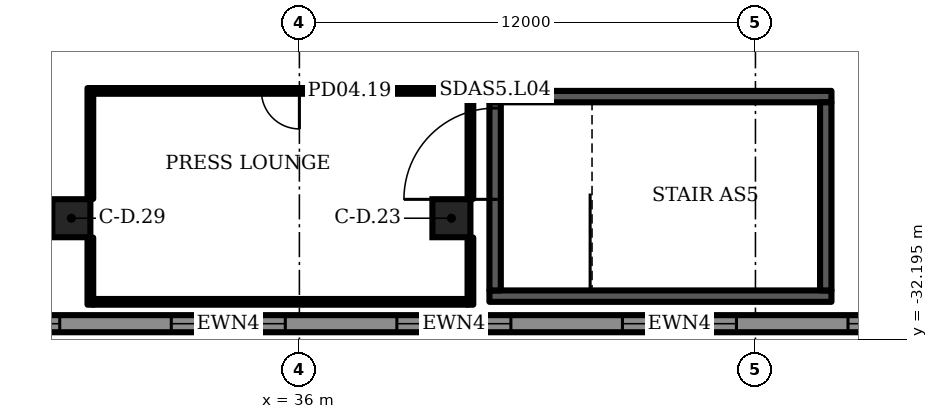
"""IFC4 building model, lengths in metres.
Left out: names, types, materials, properties, quantities, classifications, styles, units other than length and angle.
Written with IfcOpenShell. Run it as: python <this file> out.ifc"""

import sys

from ifc_helpers import new_model, si_unit, direction, frame, frame_2d, origin, origin_2d, place, context, subcontext, project, spatial, rectangle, extrude, element, fill, save


model = new_model("IFC4")
c1 = context("Model", 3, precision=1e-05, world=origin(), true_north=direction((0.0, 1.0)))
c2 = subcontext(c1, "Body", "Model", "MODEL_VIEW")
j1 = project(units=[si_unit("LENGTHUNIT", "METRE"), si_unit("PLANEANGLEUNIT", "RADIAN")], contexts=[c1])
p1 = place(None, origin())
s1 = spatial("IfcSite", under=j1, at=p1, CompositionType="ELEMENT")
p2 = place(p1, origin())
s2 = spatial("IfcBuilding", under=s1, at=p2, CompositionType="ELEMENT")
p3 = place(p2, frame((0.0, 0.0, 27.5)))
s3 = spatial("IfcBuildingStorey", under=s2, at=p3, CompositionType="ELEMENT", Elevation=27.5)
for number, where, z_axis, x_axis in (
    (1, (40.0, -29.0, 0.0), (0.0, 0.0, 1.0), (1.0, 0.0, 0.0)),
    (2, (30.0, -29.0, 0.0), (0.0, 0.0, 1.0), (1.0, 0.0, 0.0)),
):
    element("IfcColumn", number, at=place(p3, frame(where, z_axis=z_axis, x_axis=x_axis)), inside=s3, PredefinedType="COLUMN", context=c2, shape_type="SweptSolid", body=[
        extrude(rectangle(XDim=1.0, YDim=1.0, at=origin_2d()), origin(), (0.0, 0.0, 1.0), 5.5),
    ])
p4 = place(p3, frame((-4.45, -31.775, 0.0), z_axis=(0.0, 0.0, 1.0), x_axis=(1.0, 0.0, 0.0)))
e3 = element("IfcWall", 3, at=p4, inside=s3, PredefinedType="SOLIDWALL", context=c2, shape_type="SweptSolid", body=[
    extrude(rectangle(XDim=100.9, YDim=0.45, at=frame_2d((50.45, 0.0))), origin(), (0.0, 0.0, 1.0), 5.2),
])
p5 = place(p4, frame((1.468, 0.0, 1.0)))
e4 = element("IfcOpeningElement", 4, at=p5, cuts=e3, PredefinedType="OPENING", context=c2, shape_type="SweptSolid", body=[
    extrude(rectangle(XDim=3.0, YDim=3.2, at=frame_2d((1.5, 1.6))), frame((0.0, 0.235, 0.0), z_axis=(0.0, -1.0, 0.0), x_axis=(1.0, 0.0, 0.0)), (0.0, 0.0, 1.0), 0.47),
])
p6 = place(p4, frame((7.403, 0.0, 1.0)))
e5 = element("IfcOpeningElement", 5, at=p6, cuts=e3, PredefinedType="OPENING", context=c2, shape_type="SweptSolid", body=[
    extrude(rectangle(XDim=3.0, YDim=3.2, at=frame_2d((1.5, 1.6))), frame((0.0, 0.235, 0.0), z_axis=(0.0, -1.0, 0.0), x_axis=(1.0, 0.0, 0.0)), (0.0, 0.0, 1.0), 0.47),
])
p7 = place(p4, frame((13.338, 0.0, 1.0)))
e6 = element("IfcOpeningElement", 6, at=p7, cuts=e3, PredefinedType="OPENING", context=c2, shape_type="SweptSolid", body=[
    extrude(rectangle(XDim=3.0, YDim=3.2, at=frame_2d((1.5, 1.6))), frame((0.0, 0.235, 0.0), z_axis=(0.0, -1.0, 0.0), x_axis=(1.0, 0.0, 0.0)), (0.0, 0.0, 1.0), 0.47),
])
p8 = place(p4, frame((19.273, 0.0, 1.0)))
e7 = element("IfcOpeningElement", 7, at=p8, cuts=e3, PredefinedType="OPENING", context=c2, shape_type="SweptSolid", body=[
    extrude(rectangle(XDim=3.0, YDim=3.2, at=frame_2d((1.5, 1.6))), frame((0.0, 0.235, 0.0), z_axis=(0.0, -1.0, 0.0), x_axis=(1.0, 0.0, 0.0)), (0.0, 0.0, 1.0), 0.47),
])
p9 = place(p4, frame((25.209, 0.0, 1.0)))
e8 = element("IfcOpeningElement", 8, at=p9, cuts=e3, PredefinedType="OPENING", context=c2, shape_type="SweptSolid", body=[
    extrude(rectangle(XDim=3.0, YDim=3.2, at=frame_2d((1.5, 1.6))), frame((0.0, 0.235, 0.0), z_axis=(0.0, -1.0, 0.0), x_axis=(1.0, 0.0, 0.0)), (0.0, 0.0, 1.0), 0.47),
])
p10 = place(p4, frame((31.144, 0.0, 1.0)))
e9 = element("IfcOpeningElement", 9, at=p10, cuts=e3, PredefinedType="OPENING", context=c2, shape_type="SweptSolid", body=[
    extrude(rectangle(XDim=3.0, YDim=3.2, at=frame_2d((1.5, 1.6))), frame((0.0, 0.235, 0.0), z_axis=(0.0, -1.0, 0.0), x_axis=(1.0, 0.0, 0.0)), (0.0, 0.0, 1.0), 0.47),
])
p11 = place(p4, frame((37.079, 0.0, 1.0)))
e10 = element("IfcOpeningElement", 10, at=p11, cuts=e3, PredefinedType="OPENING", context=c2, shape_type="SweptSolid", body=[
    extrude(rectangle(XDim=3.0, YDim=3.2, at=frame_2d((1.5, 1.6))), frame((0.0, 0.235, 0.0), z_axis=(0.0, -1.0, 0.0), x_axis=(1.0, 0.0, 0.0)), (0.0, 0.0, 1.0), 0.47),
])
p12 = place(p4, frame((43.015, 0.0, 1.0)))
e11 = element("IfcOpeningElement", 11, at=p12, cuts=e3, PredefinedType="OPENING", context=c2, shape_type="SweptSolid", body=[
    extrude(rectangle(XDim=3.0, YDim=3.2, at=frame_2d((1.5, 1.6))), frame((0.0, 0.235, 0.0), z_axis=(0.0, -1.0, 0.0), x_axis=(1.0, 0.0, 0.0)), (0.0, 0.0, 1.0), 0.47),
])
p13 = place(p4, frame((48.95, 0.0, 1.0)))
e12 = element("IfcOpeningElement", 12, at=p13, cuts=e3, PredefinedType="OPENING", context=c2, shape_type="SweptSolid", body=[
    extrude(rectangle(XDim=3.0, YDim=3.2, at=frame_2d((1.5, 1.6))), frame((0.0, 0.235, 0.0), z_axis=(0.0, -1.0, 0.0), x_axis=(1.0, 0.0, 0.0)), (0.0, 0.0, 1.0), 0.47),
])
p14 = place(p4, frame((54.885, 0.0, 1.0)))
e13 = element("IfcOpeningElement", 13, at=p14, cuts=e3, PredefinedType="OPENING", context=c2, shape_type="SweptSolid", body=[
    extrude(rectangle(XDim=3.0, YDim=3.2, at=frame_2d((1.5, 1.6))), frame((0.0, 0.235, 0.0), z_axis=(0.0, -1.0, 0.0), x_axis=(1.0, 0.0, 0.0)), (0.0, 0.0, 1.0), 0.47),
])
p15 = place(p4, frame((60.821, 0.0, 1.0)))
e14 = element("IfcOpeningElement", 14, at=p15, cuts=e3, PredefinedType="OPENING", context=c2, shape_type="SweptSolid", body=[
    extrude(rectangle(XDim=3.0, YDim=3.2, at=frame_2d((1.5, 1.6))), frame((0.0, 0.235, 0.0), z_axis=(0.0, -1.0, 0.0), x_axis=(1.0, 0.0, 0.0)), (0.0, 0.0, 1.0), 0.47),
])
p16 = place(p4, frame((66.756, 0.0, 1.0)))
e15 = element("IfcOpeningElement", 15, at=p16, cuts=e3, PredefinedType="OPENING", context=c2, shape_type="SweptSolid", body=[
    extrude(rectangle(XDim=3.0, YDim=3.2, at=frame_2d((1.5, 1.6))), frame((0.0, 0.235, 0.0), z_axis=(0.0, -1.0, 0.0), x_axis=(1.0, 0.0, 0.0)), (0.0, 0.0, 1.0), 0.47),
])
p17 = place(p4, frame((72.691, 0.0, 1.0)))
e16 = element("IfcOpeningElement", 16, at=p17, cuts=e3, PredefinedType="OPENING", context=c2, shape_type="SweptSolid", body=[
    extrude(rectangle(XDim=3.0, YDim=3.2, at=frame_2d((1.5, 1.6))), frame((0.0, 0.235, 0.0), z_axis=(0.0, -1.0, 0.0), x_axis=(1.0, 0.0, 0.0)), (0.0, 0.0, 1.0), 0.47),
])
p18 = place(p4, frame((78.626, 0.0, 1.0)))
e17 = element("IfcOpeningElement", 17, at=p18, cuts=e3, PredefinedType="OPENING", context=c2, shape_type="SweptSolid", body=[
    extrude(rectangle(XDim=3.0, YDim=3.2, at=frame_2d((1.5, 1.6))), frame((0.0, 0.235, 0.0), z_axis=(0.0, -1.0, 0.0), x_axis=(1.0, 0.0, 0.0)), (0.0, 0.0, 1.0), 0.47),
])
p19 = place(p4, frame((84.562, 0.0, 1.0)))
e18 = element("IfcOpeningElement", 18, at=p19, cuts=e3, PredefinedType="OPENING", context=c2, shape_type="SweptSolid", body=[
    extrude(rectangle(XDim=3.0, YDim=3.2, at=frame_2d((1.5, 1.6))), frame((0.0, 0.235, 0.0), z_axis=(0.0, -1.0, 0.0), x_axis=(1.0, 0.0, 0.0)), (0.0, 0.0, 1.0), 0.47),
])
p20 = place(p4, frame((90.497, 0.0, 1.0)))
e19 = element("IfcOpeningElement", 19, at=p20, cuts=e3, PredefinedType="OPENING", context=c2, shape_type="SweptSolid", body=[
    extrude(rectangle(XDim=3.0, YDim=3.2, at=frame_2d((1.5, 1.6))), frame((0.0, 0.235, 0.0), z_axis=(0.0, -1.0, 0.0), x_axis=(1.0, 0.0, 0.0)), (0.0, 0.0, 1.0), 0.47),
])
p21 = place(p4, frame((96.432, 0.0, 1.0)))
e20 = element("IfcOpeningElement", 20, at=p21, cuts=e3, PredefinedType="OPENING", context=c2, shape_type="SweptSolid", body=[
    extrude(rectangle(XDim=3.0, YDim=3.2, at=frame_2d((1.5, 1.6))), frame((0.0, 0.235, 0.0), z_axis=(0.0, -1.0, 0.0), x_axis=(1.0, 0.0, 0.0)), (0.0, 0.0, 1.0), 0.47),
])
p22 = place(p3, frame((30.575, -31.2, 0.0), z_axis=(0.0, 0.0, 1.0), x_axis=(1.0, 0.0, 0.0)))
e21 = element("IfcWall", 21, at=p22, inside=s3, PredefinedType="PARTITIONING", context=c2, shape_type="SweptSolid", body=[
    extrude(rectangle(XDim=9.85, YDim=0.15, at=frame_2d((4.925, 0.0))), origin(), (0.0, 0.0, 1.0), 5.2),
])
p23 = place(p3, frame((40.5, -31.275, 0.0), z_axis=(0.0, 0.0, 1.0), x_axis=(0.0, 1.0, 0.0)))
e22 = element("IfcWall", 22, at=p23, inside=s3, PredefinedType="PARTITIONING", context=c2, shape_type="SweptSolid", body=[
    extrude(rectangle(XDim=1.765, YDim=0.15, at=frame_2d((0.882, 0.0))), origin(), (0.0, 0.0, 1.0), 5.2),
])
p24 = place(p3, frame((40.5, -28.49, 0.0), z_axis=(0.0, 0.0, 1.0), x_axis=(0.0, 1.0, 0.0)))
e23 = element("IfcWall", 23, at=p24, inside=s3, PredefinedType="PARTITIONING", context=c2, shape_type="SweptSolid", body=[
    extrude(rectangle(XDim=2.915, YDim=0.15, at=frame_2d((1.458, 0.0))), origin(), (0.0, 0.0, 1.0), 5.2),
])
p25 = place(p3, frame((30.575, -25.65, 0.0), z_axis=(0.0, 0.0, 1.0), x_axis=(1.0, 0.0, 0.0)))
e24 = element("IfcWall", 24, at=p25, inside=s3, PredefinedType="PARTITIONING", context=c2, shape_type="SweptSolid", body=[
    extrude(rectangle(XDim=9.85, YDim=0.15, at=frame_2d((4.925, 0.0))), origin(), (0.0, 0.0, 1.0), 5.2),
])
p26 = place(p25, frame((4.425, 0.0, 0.0)))
e25 = element("IfcOpeningElement", 25, at=p26, cuts=e24, PredefinedType="OPENING", context=c2, shape_type="SweptSolid", body=[
    extrude(rectangle(XDim=1.0, YDim=2.1, at=frame_2d((0.5, 1.05))), frame((0.0, 0.085, 0.0), z_axis=(0.0, -1.0, 0.0), x_axis=(1.0, 0.0, 0.0)), (0.0, 0.0, 1.0), 0.17),
])
p27 = place(p3, frame((30.5, -31.275, 0.0), z_axis=(0.0, 0.0, 1.0), x_axis=(0.0, 1.0, 0.0)))
e26 = element("IfcWall", 26, at=p27, inside=s3, PredefinedType="PARTITIONING", context=c2, shape_type="SweptSolid", body=[
    extrude(rectangle(XDim=1.765, YDim=0.15, at=frame_2d((0.882, 0.0))), origin(), (0.0, 0.0, 1.0), 5.2),
])
p28 = place(p3, frame((30.5, -28.49, 0.0), z_axis=(0.0, 0.0, 1.0), x_axis=(0.0, 1.0, 0.0)))
e27 = element("IfcWall", 27, at=p28, inside=s3, PredefinedType="PARTITIONING", context=c2, shape_type="SweptSolid", body=[
    extrude(rectangle(XDim=2.915, YDim=0.15, at=frame_2d((1.458, 0.0))), origin(), (0.0, 0.0, 1.0), 5.2),
])
for number, where, z_axis, x_axis in (
    (28, (41.0, -31.05, 0.0), (0.0, 0.0, 1.0), (1.0, 0.0, 0.0)),
    (29, (41.0, -25.8, 0.0), (0.0, 0.0, 1.0), (1.0, 0.0, 0.0)),
):
    element("IfcWall", number, at=place(p3, frame(where, z_axis=z_axis, x_axis=x_axis)), inside=s3, PredefinedType="SHEAR", context=c2, shape_type="SweptSolid", body=[
        extrude(rectangle(XDim=9.0, YDim=0.3, at=frame_2d((4.5, 0.0))), origin(), (0.0, 0.0, 1.0), 5.2),
    ])
p29 = place(p3, frame((41.15, -30.9, 0.0), z_axis=(0.0, 0.0, 1.0), x_axis=(0.0, 1.0, 0.0)))
e30 = element("IfcWall", 30, at=p29, inside=s3, PredefinedType="SHEAR", context=c2, shape_type="SweptSolid", body=[
    extrude(rectangle(XDim=4.95, YDim=0.3, at=frame_2d((2.475, 0.0))), origin(), (0.0, 0.0, 1.0), 5.2),
])
p30 = place(p29, frame((2.397, 0.0, 0.0)))
e31 = element("IfcOpeningElement", 31, at=p30, cuts=e30, PredefinedType="OPENING", context=c2, shape_type="SweptSolid", body=[
    extrude(rectangle(XDim=2.4, YDim=2.1, at=frame_2d((1.2, 1.05))), frame((0.0, 0.16, 0.0), z_axis=(0.0, -1.0, 0.0), x_axis=(1.0, 0.0, 0.0)), (0.0, 0.0, 1.0), 0.32),
])
p31 = place(p3, frame((49.85, -30.9, 0.0), z_axis=(0.0, 0.0, 1.0), x_axis=(0.0, 1.0, 0.0)))
e32 = element("IfcWall", 32, at=p31, inside=s3, PredefinedType="SHEAR", context=c2, shape_type="SweptSolid", body=[
    extrude(rectangle(XDim=4.95, YDim=0.3, at=frame_2d((2.475, 0.0))), origin(), (0.0, 0.0, 1.0), 5.2),
])
p32 = place(p10, origin())
e33 = element("IfcWindow", 33, at=p32, inside=s3, PartitioningType="SINGLE_PANEL", PredefinedType="WINDOW", context=c2, shape_type="SweptSolid", body=[
    extrude(rectangle(XDim=3.0, YDim=3.2, at=frame_2d((1.5, 1.6))), frame((0.0, 0.105, 0.0), z_axis=(0.0, -1.0, 0.0), x_axis=(1.0, 0.0, 0.0)), (0.0, 0.0, 1.0), 0.06),
])
fill(e9, e33)
p33 = place(p11, origin())
e34 = element("IfcWindow", 34, at=p33, inside=s3, PartitioningType="SINGLE_PANEL", PredefinedType="WINDOW", context=c2, shape_type="SweptSolid", body=[
    extrude(rectangle(XDim=3.0, YDim=3.2, at=frame_2d((1.5, 1.6))), frame((0.0, 0.105, 0.0), z_axis=(0.0, -1.0, 0.0), x_axis=(1.0, 0.0, 0.0)), (0.0, 0.0, 1.0), 0.06),
])
fill(e10, e34)
p34 = place(p12, origin())
e35 = element("IfcWindow", 35, at=p34, inside=s3, PartitioningType="SINGLE_PANEL", PredefinedType="WINDOW", context=c2, shape_type="SweptSolid", body=[
    extrude(rectangle(XDim=3.0, YDim=3.2, at=frame_2d((1.5, 1.6))), frame((0.0, 0.105, 0.0), z_axis=(0.0, -1.0, 0.0), x_axis=(1.0, 0.0, 0.0)), (0.0, 0.0, 1.0), 0.06),
])
fill(e11, e35)
p35 = place(p13, origin())
e36 = element("IfcWindow", 36, at=p35, inside=s3, PartitioningType="SINGLE_PANEL", PredefinedType="WINDOW", context=c2, shape_type="SweptSolid", body=[
    extrude(rectangle(XDim=3.0, YDim=3.2, at=frame_2d((1.5, 1.6))), frame((0.0, 0.105, 0.0), z_axis=(0.0, -1.0, 0.0), x_axis=(1.0, 0.0, 0.0)), (0.0, 0.0, 1.0), 0.06),
])
fill(e12, e36)
p36 = place(p14, origin())
e37 = element("IfcWindow", 37, at=p36, inside=s3, PartitioningType="SINGLE_PANEL", PredefinedType="WINDOW", context=c2, shape_type="SweptSolid", body=[
    extrude(rectangle(XDim=3.0, YDim=3.2, at=frame_2d((1.5, 1.6))), frame((0.0, 0.105, 0.0), z_axis=(0.0, -1.0, 0.0), x_axis=(1.0, 0.0, 0.0)), (0.0, 0.0, 1.0), 0.06),
])
fill(e13, e37)
p37 = place(p26, origin())
e38 = element("IfcDoor", 38, at=p37, inside=s3, OperationType="SINGLE_SWING_RIGHT", PredefinedType="DOOR", context=c2, shape_type="SweptSolid", body=[
    extrude(rectangle(XDim=1.0, YDim=2.1, at=frame_2d((0.5, 1.05))), frame((0.0, 0.025, 0.0), z_axis=(0.0, -1.0, 0.0), x_axis=(1.0, 0.0, 0.0)), (0.0, 0.0, 1.0), 0.05),
])
fill(e25, e38)
p38 = place(p30, origin())
e39 = element("IfcDoor", 39, at=p38, inside=s3, OperationType="DOUBLE_DOOR_SINGLE_SWING", PredefinedType="DOOR", context=c2, shape_type="SweptSolid", body=[
    extrude(rectangle(XDim=2.4, YDim=2.1, at=frame_2d((1.2, 1.05))), frame((0.0, 0.025, 0.0), z_axis=(0.0, -1.0, 0.0), x_axis=(1.0, 0.0, 0.0)), (0.0, 0.0, 1.0), 0.05),
])
fill(e31, e39)
save(model, sys.argv[1])
